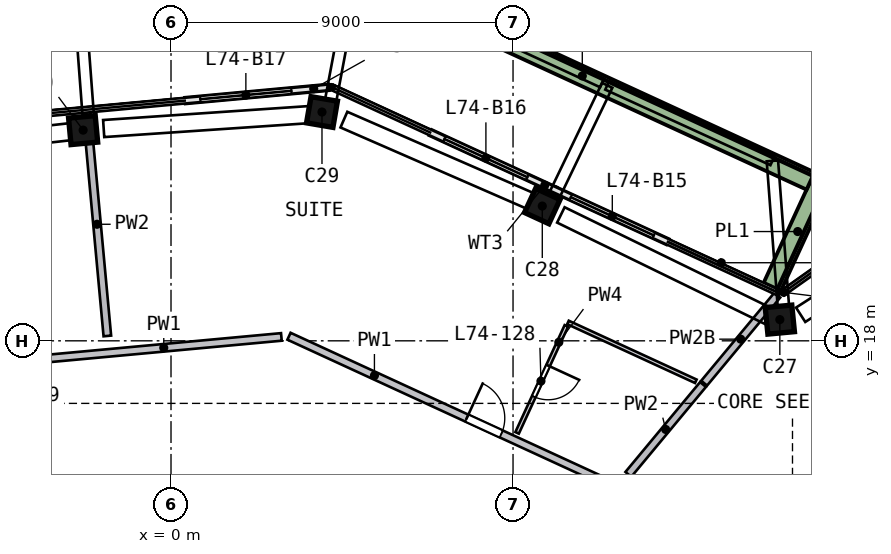
"""IFC4 building model, lengths in metres.
Left out: names, types, materials, properties, quantities, classifications, styles, units other than length and angle.
Written with IfcOpenShell. Run it as: python <this file> out.ifc"""

import sys

from ifc_helpers import new_model, si_unit, direction, frame, frame_2d, origin, origin_2d, place, context, subcontext, project, spatial, rectangle, extrude, element, fill, save


model = new_model("IFC4")
c1 = context("Model", 3, precision=1e-05, world=origin(), true_north=direction((0.0, 1.0)))
c2 = subcontext(c1, "Body", "Model", "MODEL_VIEW")
j1 = project(units=[si_unit("LENGTHUNIT", "METRE"), si_unit("PLANEANGLEUNIT", "RADIAN")], contexts=[c1])
p1 = place(None, origin())
s1 = spatial("IfcSite", under=j1, at=p1, CompositionType="ELEMENT")
p2 = place(p1, origin())
s2 = spatial("IfcBuilding", under=s1, at=p2, CompositionType="ELEMENT")
p3 = place(p2, frame((0.0, 0.0, 299.5)))
s3 = spatial("IfcBuildingStorey", under=s2, at=p3, CompositionType="ELEMENT", Elevation=299.5)
p4 = place(p3, frame((16.127, 18.466, 0.0), z_axis=(-0.088403133, 0.075936999, 0.993186014), x_axis=(0.991870787, 0.098330497, 0.080767914)))
e1 = element("IfcColumn", 1, at=p4, inside=s3, PredefinedType="COLUMN", context=c2, shape_type="SweptSolid", body=[
    extrude(rectangle(XDim=0.7, YDim=0.7, at=origin_2d()), origin(), (0.0, 0.0, 1.0), 3.212),
])
p5 = place(p3, frame((9.894, 21.49, 0.0), z_axis=(-0.102589312, 0.046237437, 0.993648596), x_axis=(-0.902393906, 0.41596114, -0.11252363)))
e2 = element("IfcColumn", 2, at=p5, inside=s3, PredefinedType="COLUMN", context=c2, shape_type="SweptSolid", body=[
    extrude(rectangle(XDim=0.7, YDim=0.7, at=origin_2d()), origin(), (0.0, 0.0, 1.0), 3.21),
])
p6 = place(p3, frame((4.111, 23.998, 0.0), z_axis=(-0.114257967, 0.018624885, 0.993276513), x_axis=(0.97894579, -0.168119967, 0.115761895)))
e3 = element("IfcColumn", 3, at=p6, inside=s3, PredefinedType="COLUMN", context=c2, shape_type="SweptSolid", body=[
    extrude(rectangle(XDim=0.7, YDim=0.7, at=origin_2d()), origin(), (0.0, 0.0, 1.0), 3.211),
])
p7 = place(p3, frame((-2.177, 23.558, 0.0), z_axis=(-0.112018614, -0.011255095, 0.993642367), x_axis=(-0.989472259, -0.090943405, -0.112578621)))
e4 = element("IfcColumn", 4, at=p7, inside=s3, PredefinedType="COLUMN", context=c2, shape_type="SweptSolid", body=[
    extrude(rectangle(XDim=0.7, YDim=0.7, at=origin_2d()), origin(), (0.0, 0.0, 1.0), 3.21),
])
p8 = place(p3, frame((13.065, 20.608, 0.0), z_axis=(0.0, 0.0, 1.0), x_axis=(-0.90835693, 0.418195752, 0.0)))
e5 = element("IfcWall", 5, at=p8, inside=s3, PredefinedType="SOLIDWALL", context=c2, shape_type="SweptSolid", body=[
    extrude(rectangle(XDim=3.25, YDim=0.15, at=frame_2d((1.625, 0.0))), origin(), (0.0, 0.0, 1.0), 2.525),
])
p9 = place(p8, frame((0.4, 0.0, 0.0)))
e6 = element("IfcOpeningElement", 6, at=p9, cuts=e5, PredefinedType="OPENING", context=c2, shape_type="SweptSolid", body=[
    extrude(rectangle(XDim=2.4, YDim=2.4, at=frame_2d((1.2, 1.2))), frame((0.0, 0.085, 0.0), z_axis=(0.0, -1.0, 0.0), x_axis=(1.0, 0.0, 0.0)), (0.0, 0.0, 1.0), 0.17),
])
p10 = place(p3, frame((10.113, 21.967, 0.0), z_axis=(0.0, 0.0, 1.0), x_axis=(-0.908376452, 0.418153346, 0.0)))
e7 = element("IfcWall", 7, at=p10, inside=s3, PredefinedType="SOLIDWALL", context=c2, shape_type="SweptSolid", body=[
    extrude(rectangle(XDim=3.611, YDim=0.15, at=frame_2d((1.806, 0.0))), origin(), (0.0, 0.0, 1.0), 2.525),
])
p11 = place(p10, frame((0.811, 0.0, 0.0)))
e8 = element("IfcOpeningElement", 8, at=p11, cuts=e7, PredefinedType="OPENING", context=c2, shape_type="SweptSolid", body=[
    extrude(rectangle(XDim=2.4, YDim=2.4, at=frame_2d((1.2, 1.2))), frame((0.0, 0.085, 0.0), z_axis=(0.0, -1.0, 0.0), x_axis=(1.0, 0.0, 0.0)), (0.0, 0.0, 1.0), 0.17),
])
p12 = place(p3, frame((4.147, 24.67, 0.0), z_axis=(0.0, 0.0, 1.0), x_axis=(-0.995758413, -0.092006427, 0.0)))
e9 = element("IfcWall", 9, at=p12, inside=s3, PredefinedType="SOLIDWALL", context=c2, shape_type="SweptSolid", body=[
    extrude(rectangle(XDim=3.787, YDim=0.15, at=frame_2d((1.893, 0.0))), origin(), (0.0, 0.0, 1.0), 2.525),
])
p13 = place(p12, frame((0.987, 0.0, 0.0)))
e10 = element("IfcOpeningElement", 10, at=p13, cuts=e9, PredefinedType="OPENING", context=c2, shape_type="SweptSolid", body=[
    extrude(rectangle(XDim=2.4, YDim=2.4, at=frame_2d((1.2, 1.2))), frame((0.0, 0.085, 0.0), z_axis=(0.0, -1.0, 0.0), x_axis=(1.0, 0.0, 0.0)), (0.0, 0.0, 1.0), 0.17),
])
p14 = place(p3, frame((15.822, 19.423, 0.0), z_axis=(0.0, 0.0, 1.0), x_axis=(0.418225571, 0.908343202, 0.0)))
e11 = element("IfcWall", 11, at=p14, inside=s3, PredefinedType="SOLIDWALL", context=c2, shape_type="SweptSolid", body=[
    extrude(rectangle(XDim=3.199, YDim=0.5, at=frame_2d((1.6, 0.0))), origin(), (0.0, 0.0, 1.0), 0.7),
])
p15 = place(p3, frame((16.828, 22.206, 0.0), z_axis=(0.0, 0.0, 1.0), x_axis=(-0.908357225, 0.418195112, 0.0)))
e12 = element("IfcWall", 12, at=p15, inside=s3, PredefinedType="SOLIDWALL", context=c2, shape_type="SweptSolid", body=[
    extrude(rectangle(XDim=13.224, YDim=0.5, at=frame_2d((6.612, 0.0))), origin(), (0.0, 0.0, 1.0), 0.7),
])
p16 = place(p3, frame((-6.372, 17.245, 0.0), z_axis=(0.0, 0.0, 1.0), x_axis=(0.995758077, 0.092010069, 0.0)))
e13 = element("IfcWall", 13, at=p16, inside=s3, PredefinedType="SOLIDWALL", context=c2, shape_type="SweptSolid", body=[
    extrude(rectangle(XDim=9.316, YDim=0.2, at=frame_2d((4.658, 0.0))), origin(), (0.0, 0.0, 1.0), 3.19),
])
p17 = place(p16, frame((1.9, 0.0, 0.0)))
e14 = element("IfcOpeningElement", 14, at=p17, cuts=e13, PredefinedType="OPENING", context=c2, shape_type="SweptSolid", body=[
    extrude(rectangle(XDim=1.0, YDim=2.1, at=frame_2d((0.5, 1.05))), frame((0.0, 0.11, 0.0), z_axis=(0.0, -1.0, 0.0), x_axis=(1.0, 0.0, 0.0)), (0.0, 0.0, 1.0), 0.22),
])
p18 = place(p3, frame((3.104, 18.121, 0.0), z_axis=(0.0, 0.0, 1.0), x_axis=(0.908366241, -0.418175527, 0.0)))
e15 = element("IfcWall", 15, at=p18, inside=s3, PredefinedType="SOLIDWALL", context=c2, shape_type="SweptSolid", body=[
    extrude(rectangle(XDim=9.316, YDim=0.2, at=frame_2d((4.658, 0.0))), origin(), (0.0, 0.0, 1.0), 3.19),
])
p19 = place(p18, frame((5.15, 0.0, 0.0)))
e16 = element("IfcOpeningElement", 16, at=p19, cuts=e15, PredefinedType="OPENING", context=c2, shape_type="SweptSolid", body=[
    extrude(rectangle(XDim=1.0, YDim=2.1, at=frame_2d((0.5, 1.05))), frame((0.0, 0.11, 0.0), z_axis=(0.0, -1.0, 0.0), x_axis=(1.0, 0.0, 0.0)), (0.0, 0.0, 1.0), 0.22),
])
p20 = place(p3, frame((13.862, 11.155, 0.0), z_axis=(0.0, 0.0, 1.0), x_axis=(0.816339076, 0.57757295, 0.0)))
e17 = element("IfcWall", 17, at=p20, inside=s3, PredefinedType="SOLIDWALL", context=c2, shape_type="SweptSolid", body=[
    extrude(rectangle(XDim=19.545, YDim=0.2, at=frame_2d((9.772, 0.0))), origin(), (0.0, 0.0, 1.0), 3.19),
])
p21 = place(p20, frame((15.0, 0.0, 0.0)))
e18 = element("IfcOpeningElement", 18, at=p21, cuts=e17, PredefinedType="OPENING", context=c2, shape_type="SweptSolid", body=[
    extrude(rectangle(XDim=1.0, YDim=2.1, at=frame_2d((0.5, 1.05))), frame((0.0, 0.11, 0.0), z_axis=(0.0, -1.0, 0.0), x_axis=(1.0, 0.0, 0.0)), (0.0, 0.0, 1.0), 0.22),
])
p22 = place(p3, frame((31.088, 20.648, 0.0), z_axis=(0.0, 0.0, 1.0), x_axis=(-0.816341334, -0.57756976, 0.0)))
e19 = element("IfcWall", 19, at=p22, inside=s3, PredefinedType="SOLIDWALL", context=c2, shape_type="SweptSolid", body=[
    extrude(rectangle(XDim=19.345, YDim=0.2, at=frame_2d((9.673, 0.0))), origin(), (0.0, 0.0, 1.0), 3.19),
])
p23 = place(p22, frame((2.05, 0.0, 0.0)))
e20 = element("IfcOpeningElement", 20, at=p23, cuts=e19, PredefinedType="OPENING", context=c2, shape_type="SweptSolid", body=[
    extrude(rectangle(XDim=1.0, YDim=2.1, at=frame_2d((0.5, 1.05))), frame((0.0, 0.11, 0.0), z_axis=(0.0, -1.0, 0.0), x_axis=(1.0, 0.0, 0.0)), (0.0, 0.0, 1.0), 0.22),
])
p24 = place(p3, frame((-1.675, 18.128, 0.0), z_axis=(0.0, 0.0, 1.0), x_axis=(-0.092027338, 0.995756481, 0.0)))
e21 = element("IfcWall", 21, at=p24, inside=s3, PredefinedType="SOLIDWALL", context=c2, shape_type="SweptSolid", body=[
    extrude(rectangle(XDim=5.903, YDim=0.2, at=frame_2d((2.951, 0.0))), origin(), (0.0, 0.0, 1.0), 3.19),
])
p25 = place(p3, frame((12.034, 14.485, 0.0), z_axis=(0.0, 0.0, 1.0), x_axis=(0.639035595, 0.769177163, 0.0)))
e22 = element("IfcWall", 22, at=p25, inside=s3, PredefinedType="SOLIDWALL", context=c2, shape_type="SweptSolid", body=[
    extrude(rectangle(XDim=3.075, YDim=0.2, at=frame_2d((1.537, 0.0))), origin(), (0.0, 0.0, 1.0), 3.19),
])
p26 = place(p3, frame((14.029, 16.885, 0.0), z_axis=(0.0, 0.0, 1.0), x_axis=(0.63904331, 0.769170754, 0.0)))
e23 = element("IfcWall", 23, at=p26, inside=s3, PredefinedType="SOLIDWALL", context=c2, shape_type="SweptSolid", body=[
    extrude(rectangle(XDim=3.011, YDim=0.2, at=frame_2d((1.506, 0.0))), origin(), (0.0, 0.0, 1.0), 2.69),
])
p27 = place(p3, frame((10.404, 18.393, 0.0), z_axis=(0.0, 0.0, 1.0), x_axis=(-0.418188991, -0.908360043, 0.0)))
e24 = element("IfcWall", 24, at=p27, inside=s3, PredefinedType="PARTITIONING", context=c2, shape_type="SweptSolid", body=[
    extrude(rectangle(XDim=3.1, YDim=0.1, at=frame_2d((1.55, 0.0))), origin(), (0.0, 0.0, 1.0), 3.19),
])
p28 = place(p27, frame((1.15, 0.0, 0.0)))
e25 = element("IfcOpeningElement", 25, at=p28, cuts=e24, PredefinedType="OPENING", context=c2, shape_type="SweptSolid", body=[
    extrude(rectangle(XDim=0.9, YDim=2.1, at=frame_2d((0.45, 1.05))), frame((0.0, 0.06, 0.0), z_axis=(0.0, -1.0, 0.0), x_axis=(1.0, 0.0, 0.0)), (0.0, 0.0, 1.0), 0.12),
])
p29 = place(p3, frame((10.445, 18.484, 0.0), z_axis=(0.0, 0.0, 1.0), x_axis=(0.908371796, -0.418163462, 0.0)))
e26 = element("IfcWall", 26, at=p29, inside=s3, PredefinedType="PARTITIONING", context=c2, shape_type="SweptSolid", body=[
    extrude(rectangle(XDim=3.704, YDim=0.1, at=frame_2d((1.852, 0.0))), origin(), (0.0, 0.0, 1.0), 3.19),
])
p30 = place(p9, origin())
e27 = element("IfcDoor", 27, at=p30, inside=s3, OperationType="SLIDING_TO_RIGHT", PredefinedType="DOOR", context=c2, shape_type="SweptSolid", body=[
    extrude(rectangle(XDim=2.4, YDim=2.4, at=frame_2d((1.2, 1.2))), frame((0.0, 0.025, 0.0), z_axis=(0.0, -1.0, 0.0), x_axis=(1.0, 0.0, 0.0)), (0.0, 0.0, 1.0), 0.05),
])
fill(e6, e27)
p31 = place(p11, origin())
e28 = element("IfcDoor", 28, at=p31, inside=s3, OperationType="SLIDING_TO_LEFT", PredefinedType="DOOR", context=c2, shape_type="SweptSolid", body=[
    extrude(rectangle(XDim=2.4, YDim=2.4, at=frame_2d((1.2, 1.2))), frame((0.0, 0.025, 0.0), z_axis=(0.0, -1.0, 0.0), x_axis=(1.0, 0.0, 0.0)), (0.0, 0.0, 1.0), 0.05),
])
fill(e8, e28)
p32 = place(p13, origin())
e29 = element("IfcDoor", 29, at=p32, inside=s3, OperationType="SLIDING_TO_LEFT", PredefinedType="DOOR", context=c2, shape_type="SweptSolid", body=[
    extrude(rectangle(XDim=2.4, YDim=2.4, at=frame_2d((1.2, 1.2))), frame((0.0, 0.025, 0.0), z_axis=(0.0, -1.0, 0.0), x_axis=(1.0, 0.0, 0.0)), (0.0, 0.0, 1.0), 0.05),
])
fill(e10, e29)
p33 = place(p19, origin())
e30 = element("IfcDoor", 30, at=p33, inside=s3, OperationType="SINGLE_SWING_LEFT", PredefinedType="DOOR", context=c2, shape_type="SweptSolid", body=[
    extrude(rectangle(XDim=1.0, YDim=2.1, at=frame_2d((0.5, 1.05))), frame((0.0, 0.025, 0.0), z_axis=(0.0, -1.0, 0.0), x_axis=(1.0, 0.0, 0.0)), (0.0, 0.0, 1.0), 0.05),
])
fill(e16, e30)
p34 = place(p28, origin())
e31 = element("IfcDoor", 31, at=p34, inside=s3, OperationType="SINGLE_SWING_LEFT", PredefinedType="DOOR", context=c2, shape_type="SweptSolid", body=[
    extrude(rectangle(XDim=0.9, YDim=2.1, at=frame_2d((0.45, 1.05))), frame((0.0, 0.025, 0.0), z_axis=(0.0, -1.0, 0.0), x_axis=(1.0, 0.0, 0.0)), (0.0, 0.0, 1.0), 0.05),
])
fill(e25, e31)
save(model, sys.argv[1])
